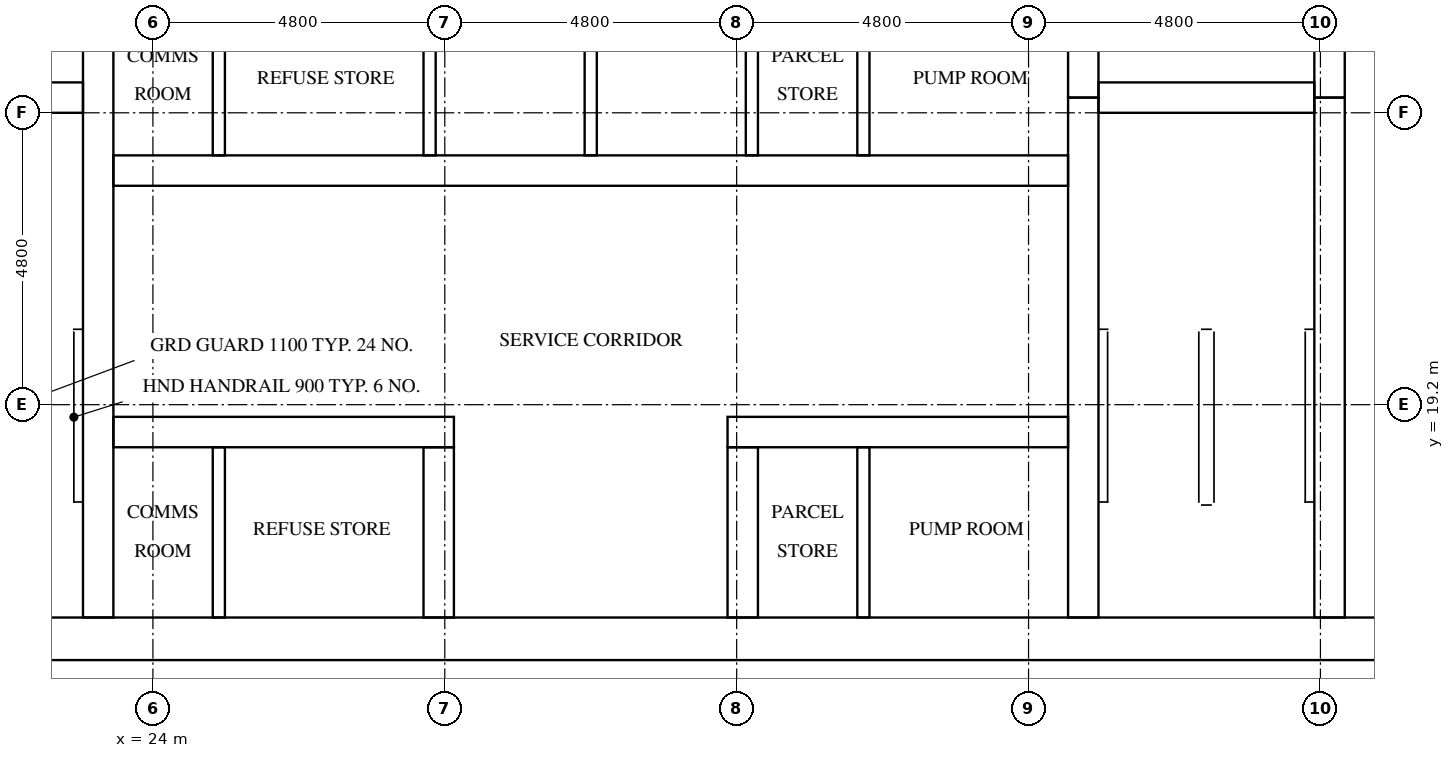
"""IFC4 building model, lengths in metres.
Left out: names, types, materials, properties, quantities, classifications, styles, units other than length and angle.
Written with IfcOpenShell. Run it as: python <this file> out.ifc"""

import sys

from ifc_helpers import new_model, si_unit, direction, frame, frame_2d, origin, place, context, subcontext, project, spatial, rectangle, extrude, element, fill, save


model = new_model("IFC4")
c1 = context("Model", 3, precision=1e-05, world=origin(), true_north=direction((0.0, 1.0)))
c2 = subcontext(c1, "Body", "Model", "MODEL_VIEW")
j1 = project(units=[si_unit("LENGTHUNIT", "METRE"), si_unit("PLANEANGLEUNIT", "RADIAN")], contexts=[c1])
p1 = place(None, origin())
s1 = spatial("IfcSite", under=j1, at=p1, CompositionType="ELEMENT")
p2 = place(p1, origin())
s2 = spatial("IfcBuilding", under=s1, at=p2, CompositionType="ELEMENT")
p3 = place(p2, frame((0.0, 0.0, 212.3)))
s3 = spatial("IfcBuildingStorey", under=s2, at=p3, CompositionType="ELEMENT", Elevation=212.3)
p4 = place(p3, frame((15.0, 15.35, 0.0), z_axis=(0.0, 0.0, 1.0), x_axis=(1.0, 0.0, 0.0)))
e1 = element("IfcWall", 1, at=p4, inside=s3, PredefinedType="SHEAR", context=c2, shape_type="SweptSolid", body=[
    extrude(rectangle(XDim=32.4, YDim=0.7, at=frame_2d((16.2, 0.0))), origin(), (0.0, 0.0, 1.0), 3.2),
])
p5 = place(p4, frame((15.3, 0.0, 0.0)))
e2 = element("IfcOpeningElement", 2, at=p5, cuts=e1, PredefinedType="OPENING", context=c2, shape_type="SweptSolid", body=[
    extrude(rectangle(XDim=1.8, YDim=2.1, at=frame_2d((0.9, 1.05))), frame((0.0, 0.36, 0.0), z_axis=(0.0, -1.0, 0.0), x_axis=(1.0, 0.0, 0.0)), (0.0, 0.0, 1.0), 0.72),
])
p6 = place(p3, frame((23.1, 15.7, 0.0), z_axis=(0.0, 0.0, 1.0), x_axis=(0.0, 1.0, 0.0)))
e3 = element("IfcWall", 3, at=p6, inside=s3, PredefinedType="SHEAR", context=c2, shape_type="SweptSolid", body=[
    extrude(rectangle(XDim=21.4, YDim=0.5, at=frame_2d((10.7, 0.0))), origin(), (0.0, 0.0, 1.0), 3.2),
])
p7 = place(p3, frame((39.3, 15.7, 0.0), z_axis=(0.0, 0.0, 1.0), x_axis=(0.0, 1.0, 0.0)))
e4 = element("IfcWall", 4, at=p7, inside=s3, PredefinedType="SHEAR", context=c2, shape_type="SweptSolid", body=[
    extrude(rectangle(XDim=8.55, YDim=0.5, at=frame_2d((4.275, 0.0))), origin(), (0.0, 0.0, 1.0), 3.2),
])
p8 = place(p3, frame((39.3, 24.25, 0.0), z_axis=(0.0, 0.0, 1.0), x_axis=(0.0, 1.0, 0.0)))
e5 = element("IfcWall", 5, at=p8, inside=s3, PredefinedType="SHEAR", context=c2, shape_type="SweptSolid", body=[
    extrude(rectangle(XDim=3.5, YDim=0.5, at=frame_2d((1.75, 0.0))), origin(), (0.0, 0.0, 1.0), 3.2),
])
p9 = place(p3, frame((43.35, 15.7, 0.0), z_axis=(0.0, 0.0, 1.0), x_axis=(0.0, 1.0, 0.0)))
e6 = element("IfcWall", 6, at=p9, inside=s3, PredefinedType="SHEAR", context=c2, shape_type="SweptSolid", body=[
    extrude(rectangle(XDim=8.55, YDim=0.5, at=frame_2d((4.275, 0.0))), origin(), (0.0, 0.0, 1.0), 3.2),
])
p10 = place(p9, frame((0.5, 0.0, 0.0)))
e7 = element("IfcOpeningElement", 7, at=p10, cuts=e6, PredefinedType="OPENING", context=c2, shape_type="SweptSolid", body=[
    extrude(rectangle(XDim=1.2, YDim=2.1, at=frame_2d((0.6, 1.05))), frame((0.0, 0.26, 0.0), z_axis=(0.0, -1.0, 0.0), x_axis=(1.0, 0.0, 0.0)), (0.0, 0.0, 1.0), 0.52),
])
p11 = place(p3, frame((43.35, 24.25, 0.0), z_axis=(0.0, 0.0, 1.0), x_axis=(0.0, 1.0, 0.0)))
e8 = element("IfcWall", 8, at=p11, inside=s3, PredefinedType="SHEAR", context=c2, shape_type="SweptSolid", body=[
    extrude(rectangle(XDim=3.5, YDim=0.5, at=frame_2d((1.75, 0.0))), origin(), (0.0, 0.0, 1.0), 3.2),
])
p12 = place(p11, frame((1.2, 0.0, 0.0)))
e9 = element("IfcOpeningElement", 9, at=p12, cuts=e8, PredefinedType="OPENING", context=c2, shape_type="SweptSolid", body=[
    extrude(rectangle(XDim=1.1, YDim=2.1, at=frame_2d((0.55, 1.05))), frame((0.0, 0.26, 0.0), z_axis=(0.0, -1.0, 0.0), x_axis=(1.0, 0.0, 0.0)), (0.0, 0.0, 1.0), 0.52),
])
for number, where, z_axis, x_axis in (
    (10, (19.3, 24.25, 0.0), (0.0, 0.0, 1.0), (1.0, 0.0, 0.0)),
    (11, (39.55, 24.25, 0.0), (0.0, 0.0, 1.0), (1.0, 0.0, 0.0)),
):
    element("IfcWall", number, at=place(p3, frame(where, z_axis=z_axis, x_axis=x_axis)), inside=s3, PredefinedType="SHEAR", context=c2, shape_type="SweptSolid", body=[
        extrude(rectangle(XDim=3.55, YDim=0.5, at=frame_2d((1.775, 0.0))), origin(), (0.0, 0.0, 1.0), 3.2),
    ])
p13 = place(p3, frame((23.35, 18.75, 0.0), z_axis=(0.0, 0.0, 1.0), x_axis=(1.0, 0.0, 0.0)))
e12 = element("IfcWall", 12, at=p13, inside=s3, PredefinedType="SHEAR", context=c2, shape_type="SweptSolid", body=[
    extrude(rectangle(XDim=5.6, YDim=0.5, at=frame_2d((2.8, 0.0))), origin(), (0.0, 0.0, 1.0), 3.2),
])
p14 = place(p13, frame((0.317, 0.0, 0.0)))
e13 = element("IfcOpeningElement", 13, at=p14, cuts=e12, PredefinedType="OPENING", context=c2, shape_type="SweptSolid", body=[
    extrude(rectangle(XDim=1.0, YDim=2.1, at=frame_2d((0.5, 1.05))), frame((0.0, 0.26, 0.0), z_axis=(0.0, -1.0, 0.0), x_axis=(1.0, 0.0, 0.0)), (0.0, 0.0, 1.0), 0.52),
])
p15 = place(p13, frame((2.967, 0.0, 0.0)))
e14 = element("IfcOpeningElement", 14, at=p15, cuts=e12, PredefinedType="OPENING", context=c2, shape_type="SweptSolid", body=[
    extrude(rectangle(XDim=1.0, YDim=2.1, at=frame_2d((0.5, 1.05))), frame((0.0, 0.26, 0.0), z_axis=(0.0, -1.0, 0.0), x_axis=(1.0, 0.0, 0.0)), (0.0, 0.0, 1.0), 0.52),
])
p16 = place(p3, frame((33.45, 18.75, 0.0), z_axis=(0.0, 0.0, 1.0), x_axis=(1.0, 0.0, 0.0)))
e15 = element("IfcWall", 15, at=p16, inside=s3, PredefinedType="SHEAR", context=c2, shape_type="SweptSolid", body=[
    extrude(rectangle(XDim=5.6, YDim=0.5, at=frame_2d((2.8, 0.0))), origin(), (0.0, 0.0, 1.0), 3.2),
])
p17 = place(p16, frame((0.817, 0.0, 0.0)))
e16 = element("IfcOpeningElement", 16, at=p17, cuts=e15, PredefinedType="OPENING", context=c2, shape_type="SweptSolid", body=[
    extrude(rectangle(XDim=1.0, YDim=2.1, at=frame_2d((0.5, 1.05))), frame((0.0, 0.26, 0.0), z_axis=(0.0, -1.0, 0.0), x_axis=(1.0, 0.0, 0.0)), (0.0, 0.0, 1.0), 0.52),
])
p18 = place(p16, frame((3.467, 0.0, 0.0)))
e17 = element("IfcOpeningElement", 17, at=p18, cuts=e15, PredefinedType="OPENING", context=c2, shape_type="SweptSolid", body=[
    extrude(rectangle(XDim=1.0, YDim=2.1, at=frame_2d((0.5, 1.05))), frame((0.0, 0.26, 0.0), z_axis=(0.0, -1.0, 0.0), x_axis=(1.0, 0.0, 0.0)), (0.0, 0.0, 1.0), 0.52),
])
p19 = place(p3, frame((23.35, 23.05, 0.0), z_axis=(0.0, 0.0, 1.0), x_axis=(1.0, 0.0, 0.0)))
e18 = element("IfcWall", 18, at=p19, inside=s3, PredefinedType="SHEAR", context=c2, shape_type="SweptSolid", body=[
    extrude(rectangle(XDim=15.7, YDim=0.5, at=frame_2d((7.85, 0.0))), origin(), (0.0, 0.0, 1.0), 3.2),
])
p20 = place(p19, frame((0.317, 0.0, 0.0)))
e19 = element("IfcOpeningElement", 19, at=p20, cuts=e18, PredefinedType="OPENING", context=c2, shape_type="SweptSolid", body=[
    extrude(rectangle(XDim=1.0, YDim=2.1, at=frame_2d((0.5, 1.05))), frame((0.0, 0.26, 0.0), z_axis=(0.0, -1.0, 0.0), x_axis=(1.0, 0.0, 0.0)), (0.0, 0.0, 1.0), 0.52),
])
p21 = place(p19, frame((2.967, 0.0, 0.0)))
e20 = element("IfcOpeningElement", 20, at=p21, cuts=e18, PredefinedType="OPENING", context=c2, shape_type="SweptSolid", body=[
    extrude(rectangle(XDim=1.0, YDim=2.1, at=frame_2d((0.5, 1.05))), frame((0.0, 0.26, 0.0), z_axis=(0.0, -1.0, 0.0), x_axis=(1.0, 0.0, 0.0)), (0.0, 0.0, 1.0), 0.52),
])
p22 = place(p19, frame((10.917, 0.0, 0.0)))
e21 = element("IfcOpeningElement", 21, at=p22, cuts=e18, PredefinedType="OPENING", context=c2, shape_type="SweptSolid", body=[
    extrude(rectangle(XDim=1.0, YDim=2.1, at=frame_2d((0.5, 1.05))), frame((0.0, 0.26, 0.0), z_axis=(0.0, -1.0, 0.0), x_axis=(1.0, 0.0, 0.0)), (0.0, 0.0, 1.0), 0.52),
])
p23 = place(p19, frame((13.567, 0.0, 0.0)))
e22 = element("IfcOpeningElement", 22, at=p23, cuts=e18, PredefinedType="OPENING", context=c2, shape_type="SweptSolid", body=[
    extrude(rectangle(XDim=1.0, YDim=2.1, at=frame_2d((0.5, 1.05))), frame((0.0, 0.26, 0.0), z_axis=(0.0, -1.0, 0.0), x_axis=(1.0, 0.0, 0.0)), (0.0, 0.0, 1.0), 0.52),
])
for number, where, z_axis, x_axis in (
    (23, (28.7, 15.7, 0.0), (0.0, 0.0, 1.0), (0.0, 1.0, 0.0)),
    (24, (33.7, 15.7, 0.0), (0.0, 0.0, 1.0), (0.0, 1.0, 0.0)),
):
    element("IfcWall", number, at=place(p3, frame(where, z_axis=z_axis, x_axis=x_axis)), inside=s3, PredefinedType="SHEAR", context=c2, shape_type="SweptSolid", body=[
        extrude(rectangle(XDim=2.8, YDim=0.5, at=frame_2d((1.4, 0.0))), origin(), (0.0, 0.0, 1.0), 3.2),
    ])
for number, where, z_axis, x_axis in (
    (25, (28.55, 23.3, 0.0), (0.0, 0.0, 1.0), (0.0, 1.0, 0.0)),
    (26, (31.2, 23.3, 0.0), (0.0, 0.0, 1.0), (0.0, 1.0, 0.0)),
    (27, (33.85, 23.3, 0.0), (0.0, 0.0, 1.0), (0.0, 1.0, 0.0)),
):
    element("IfcWall", number, at=place(p3, frame(where, z_axis=z_axis, x_axis=x_axis)), inside=s3, PredefinedType="SOLIDWALL", context=c2, shape_type="SweptSolid", body=[
        extrude(rectangle(XDim=2.6, YDim=0.2, at=frame_2d((1.3, 0.0))), origin(), (0.0, 0.0, 1.0), 3.2),
    ])
for number, where, z_axis, x_axis in (
    (28, (25.084, 23.3, 0.0), (0.0, 0.0, 1.0), (0.0, 1.0, 0.0)),
    (29, (35.684, 23.3, 0.0), (0.0, 0.0, 1.0), (0.0, 1.0, 0.0)),
):
    element("IfcWall", number, at=place(p3, frame(where, z_axis=z_axis, x_axis=x_axis)), inside=s3, PredefinedType="PARTITIONING", context=c2, shape_type="SweptSolid", body=[
        extrude(rectangle(XDim=2.6, YDim=0.2, at=frame_2d((1.3, 0.0))), origin(), (0.0, 0.0, 1.0), 3.2),
    ])
for number, where, z_axis, x_axis in (
    (30, (25.084, 15.7, 0.0), (0.0, 0.0, 1.0), (0.0, 1.0, 0.0)),
    (31, (35.684, 15.7, 0.0), (0.0, 0.0, 1.0), (0.0, 1.0, 0.0)),
):
    element("IfcWall", number, at=place(p3, frame(where, z_axis=z_axis, x_axis=x_axis)), inside=s3, PredefinedType="PARTITIONING", context=c2, shape_type="SweptSolid", body=[
        extrude(rectangle(XDim=2.8, YDim=0.2, at=frame_2d((1.4, 0.0))), origin(), (0.0, 0.0, 1.0), 3.2),
    ])
p24 = place(p10, origin())
e32 = element("IfcDoor", 32, at=p24, inside=s3, OperationType="SINGLE_SWING_RIGHT", PredefinedType="DOOR", context=c2, shape_type="SweptSolid", body=[
    extrude(rectangle(XDim=1.2, YDim=2.1, at=frame_2d((0.6, 1.05))), frame((0.0, 0.025, 0.0), z_axis=(0.0, -1.0, 0.0), x_axis=(1.0, 0.0, 0.0)), (0.0, 0.0, 1.0), 0.05),
])
fill(e7, e32)
p25 = place(p5, frame((1.8, 0.0, 0.0), z_axis=(0.0, 0.0, 1.0), x_axis=(-1.0, 0.0, 0.0)))
e33 = element("IfcDoor", 33, at=p25, inside=s3, OperationType="DOUBLE_DOOR_SINGLE_SWING", PredefinedType="DOOR", context=c2, shape_type="SweptSolid", body=[
    extrude(rectangle(XDim=1.8, YDim=2.1, at=frame_2d((0.9, 1.05))), frame((0.0, 0.025, 0.0), z_axis=(0.0, -1.0, 0.0), x_axis=(1.0, 0.0, 0.0)), (0.0, 0.0, 1.0), 0.05),
])
fill(e2, e33)
p26 = place(p20, frame((1.0, 0.0, 0.0), z_axis=(0.0, 0.0, 1.0), x_axis=(-1.0, 0.0, 0.0)))
e34 = element("IfcDoor", 34, at=p26, inside=s3, OperationType="SINGLE_SWING_RIGHT", PredefinedType="DOOR", context=c2, shape_type="SweptSolid", body=[
    extrude(rectangle(XDim=1.0, YDim=2.1, at=frame_2d((0.5, 1.05))), frame((0.0, 0.025, 0.0), z_axis=(0.0, -1.0, 0.0), x_axis=(1.0, 0.0, 0.0)), (0.0, 0.0, 1.0), 0.05),
])
fill(e19, e34)
p27 = place(p21, frame((1.0, 0.0, 0.0), z_axis=(0.0, 0.0, 1.0), x_axis=(-1.0, 0.0, 0.0)))
e35 = element("IfcDoor", 35, at=p27, inside=s3, OperationType="SINGLE_SWING_LEFT", PredefinedType="DOOR", context=c2, shape_type="SweptSolid", body=[
    extrude(rectangle(XDim=1.0, YDim=2.1, at=frame_2d((0.5, 1.05))), frame((0.0, 0.025, 0.0), z_axis=(0.0, -1.0, 0.0), x_axis=(1.0, 0.0, 0.0)), (0.0, 0.0, 1.0), 0.05),
])
fill(e20, e35)
p28 = place(p22, frame((1.0, 0.0, 0.0), z_axis=(0.0, 0.0, 1.0), x_axis=(-1.0, 0.0, 0.0)))
e36 = element("IfcDoor", 36, at=p28, inside=s3, OperationType="SINGLE_SWING_RIGHT", PredefinedType="DOOR", context=c2, shape_type="SweptSolid", body=[
    extrude(rectangle(XDim=1.0, YDim=2.1, at=frame_2d((0.5, 1.05))), frame((0.0, 0.025, 0.0), z_axis=(0.0, -1.0, 0.0), x_axis=(1.0, 0.0, 0.0)), (0.0, 0.0, 1.0), 0.05),
])
fill(e21, e36)
p29 = place(p23, frame((1.0, 0.0, 0.0), z_axis=(0.0, 0.0, 1.0), x_axis=(-1.0, 0.0, 0.0)))
e37 = element("IfcDoor", 37, at=p29, inside=s3, OperationType="SINGLE_SWING_LEFT", PredefinedType="DOOR", context=c2, shape_type="SweptSolid", body=[
    extrude(rectangle(XDim=1.0, YDim=2.1, at=frame_2d((0.5, 1.05))), frame((0.0, 0.025, 0.0), z_axis=(0.0, -1.0, 0.0), x_axis=(1.0, 0.0, 0.0)), (0.0, 0.0, 1.0), 0.05),
])
fill(e22, e37)
p30 = place(p14, origin())
e38 = element("IfcDoor", 38, at=p30, inside=s3, OperationType="SINGLE_SWING_RIGHT", PredefinedType="DOOR", context=c2, shape_type="SweptSolid", body=[
    extrude(rectangle(XDim=1.0, YDim=2.1, at=frame_2d((0.5, 1.05))), frame((0.0, 0.025, 0.0), z_axis=(0.0, -1.0, 0.0), x_axis=(1.0, 0.0, 0.0)), (0.0, 0.0, 1.0), 0.05),
])
fill(e13, e38)
p31 = place(p15, origin())
e39 = element("IfcDoor", 39, at=p31, inside=s3, OperationType="SINGLE_SWING_LEFT", PredefinedType="DOOR", context=c2, shape_type="SweptSolid", body=[
    extrude(rectangle(XDim=1.0, YDim=2.1, at=frame_2d((0.5, 1.05))), frame((0.0, 0.025, 0.0), z_axis=(0.0, -1.0, 0.0), x_axis=(1.0, 0.0, 0.0)), (0.0, 0.0, 1.0), 0.05),
])
fill(e14, e39)
p32 = place(p17, origin())
e40 = element("IfcDoor", 40, at=p32, inside=s3, OperationType="SINGLE_SWING_RIGHT", PredefinedType="DOOR", context=c2, shape_type="SweptSolid", body=[
    extrude(rectangle(XDim=1.0, YDim=2.1, at=frame_2d((0.5, 1.05))), frame((0.0, 0.025, 0.0), z_axis=(0.0, -1.0, 0.0), x_axis=(1.0, 0.0, 0.0)), (0.0, 0.0, 1.0), 0.05),
])
fill(e16, e40)
p33 = place(p18, origin())
e41 = element("IfcDoor", 41, at=p33, inside=s3, OperationType="SINGLE_SWING_LEFT", PredefinedType="DOOR", context=c2, shape_type="SweptSolid", body=[
    extrude(rectangle(XDim=1.0, YDim=2.1, at=frame_2d((0.5, 1.05))), frame((0.0, 0.025, 0.0), z_axis=(0.0, -1.0, 0.0), x_axis=(1.0, 0.0, 0.0)), (0.0, 0.0, 1.0), 0.05),
])
fill(e17, e41)
save(model, sys.argv[1])
